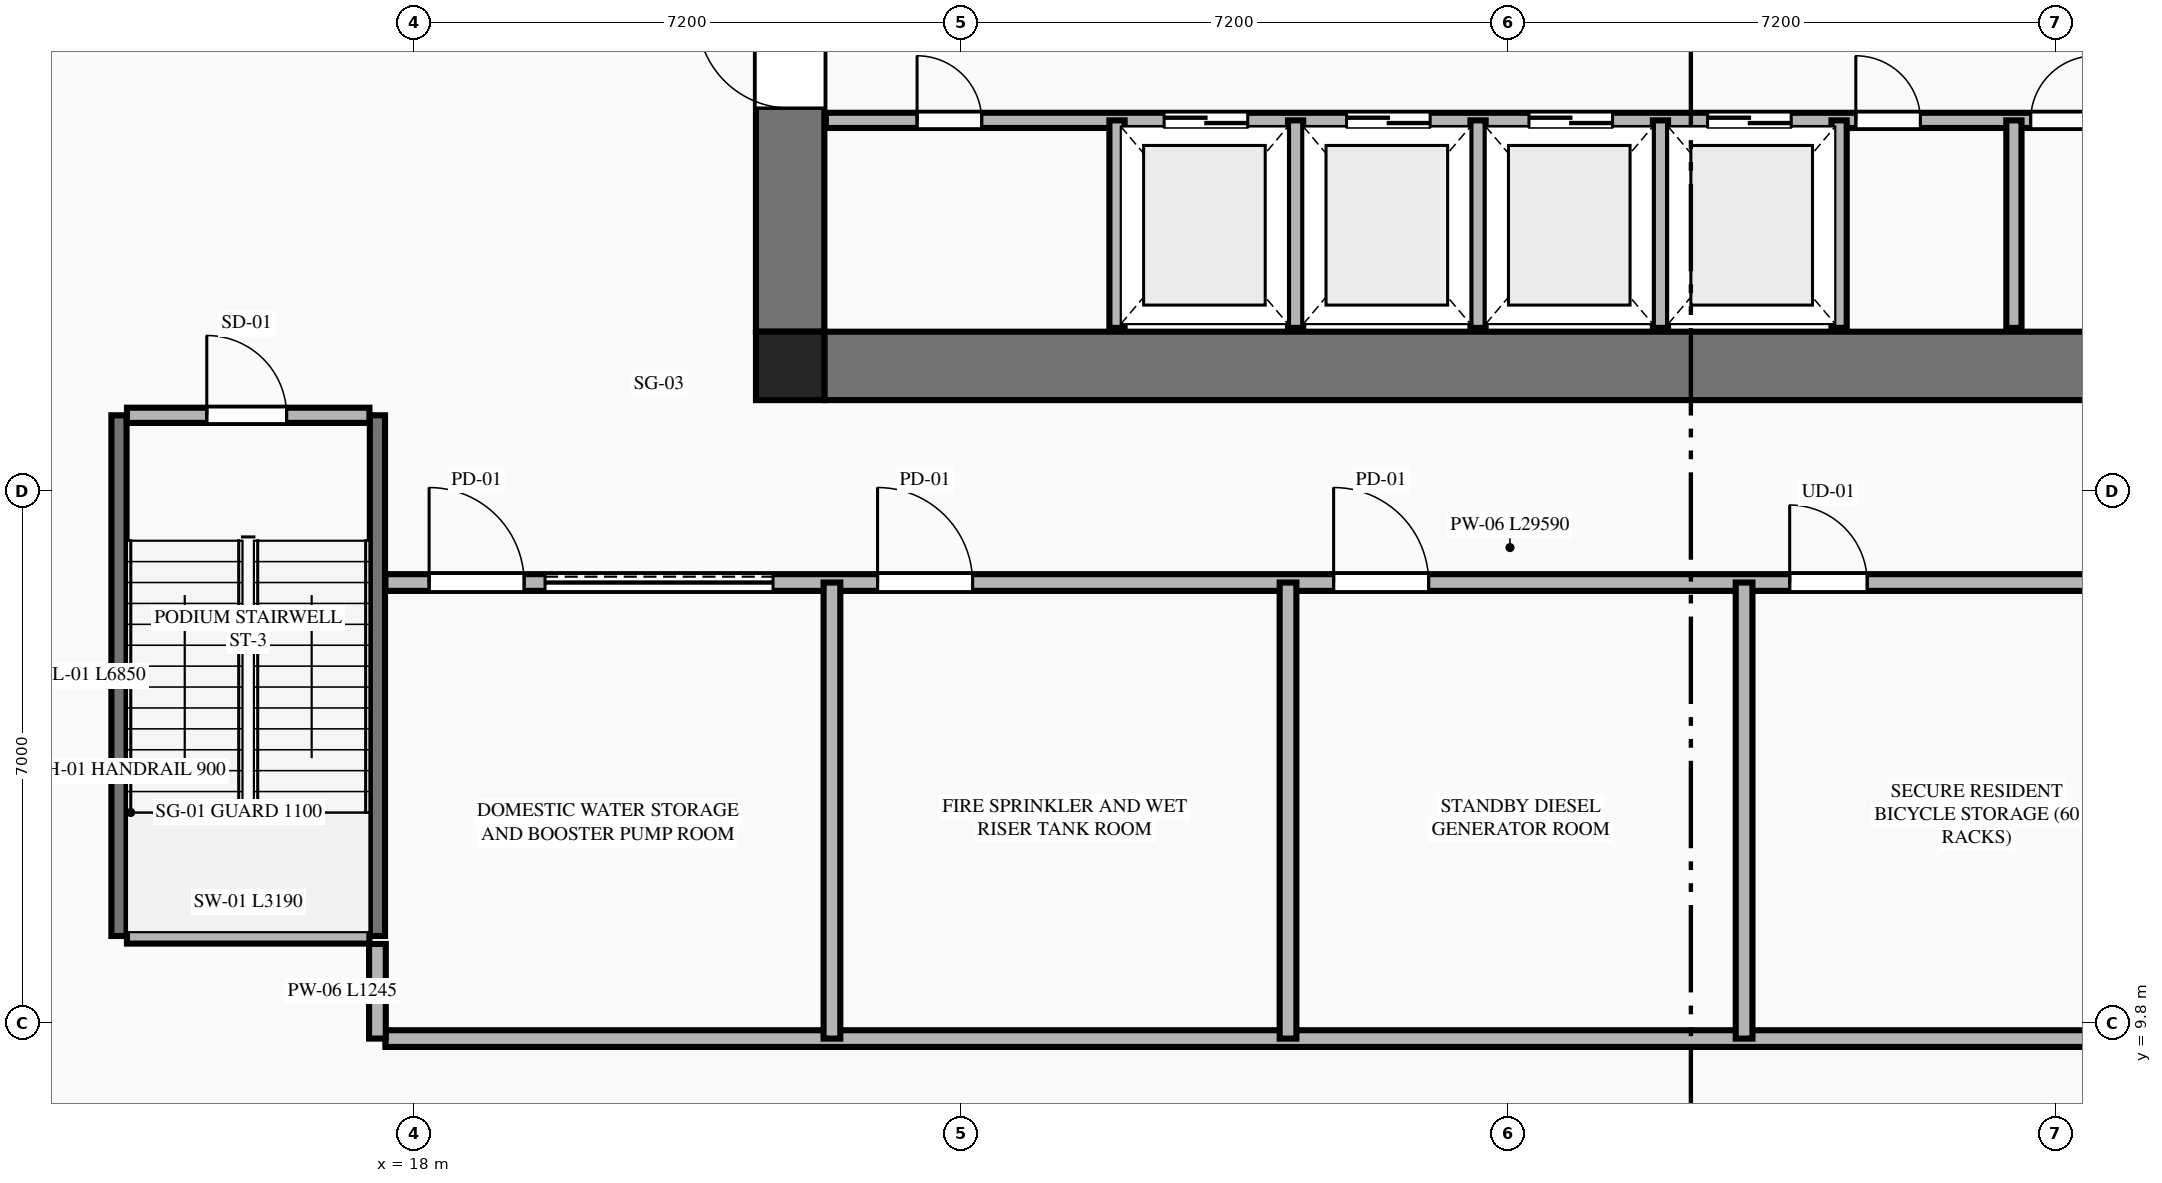
"""IFC4 building model, lengths in metres.
Left out: names, types, materials, properties, quantities, classifications, styles, units other than length and angle.
Written with IfcOpenShell. Run it as: python <this file> out.ifc"""

import sys

from ifc_helpers import new_model, si_unit, direction, frame, frame_2d, origin, origin_2d, place, context, subcontext, project, spatial, rectangle, extrude, element, fill, save


model = new_model("IFC4")
c1 = context("Model", 3, precision=1e-05, world=origin(), true_north=direction((0.0, 1.0)))
c2 = subcontext(c1, "Body", "Model", "MODEL_VIEW")
j1 = project(units=[si_unit("LENGTHUNIT", "METRE"), si_unit("PLANEANGLEUNIT", "RADIAN")], contexts=[c1])
p1 = place(None, origin())
s1 = spatial("IfcSite", under=j1, at=p1, CompositionType="ELEMENT")
p2 = place(p1, origin())
s2 = spatial("IfcBuilding", under=s1, at=p2, CompositionType="ELEMENT")
p3 = place(p2, frame((0.0, 0.0, -4.8)))
s3 = spatial("IfcBuildingStorey", under=s2, at=p3, CompositionType="ELEMENT", Elevation=-4.8)
p4 = place(p3, frame((1.027, 24.488, 0.0), z_axis=(0.0, 0.0, 1.0), x_axis=(0.484504224603, -0.874788921021, 0.0)))
e1 = element("IfcWall", 1, at=p4, inside=s3, PredefinedType="USERDEFINED", context=c2, shape_type="SweptSolid", body=[
    extrude(rectangle(XDim=26.15, YDim=0.6, at=frame_2d((13.075, 0.0))), origin(), (0.0, 0.0, 1.0), 4.55),
])
p5 = place(p3, frame((22.95, 18.45, 0.0), z_axis=(0.0, 0.0, 1.0), x_axis=(1.0, 0.0, 0.0)))
e2 = element("IfcColumn", 2, at=p5, inside=s3, PredefinedType="COLUMN", context=c2, shape_type="SweptSolid", body=[
    extrude(rectangle(XDim=0.9, YDim=0.9, at=origin_2d()), origin(), (0.0, 0.0, 1.0), 4.8),
])
p6 = place(p3, frame((23.4, 18.45, 0.0), z_axis=(0.0, 0.0, 1.0), x_axis=(1.0, 0.0, 0.0)))
e3 = element("IfcWall", 3, at=p6, inside=s3, PredefinedType="SHEAR", context=c2, shape_type="SweptSolid", body=[
    extrude(rectangle(XDim=18.0, YDim=0.9, at=frame_2d((9.0, 0.0))), origin(), (0.0, 0.0, 1.0), 4.55),
])
p7 = place(p3, frame((22.95, 18.9, 0.0), z_axis=(0.0, 0.0, 1.0), x_axis=(0.0, 1.0, 0.0)))
e4 = element("IfcWall", 4, at=p7, inside=s3, PredefinedType="SHEAR", context=c2, shape_type="SweptSolid", body=[
    extrude(rectangle(XDim=14.0, YDim=0.9, at=frame_2d((7.0, 0.0))), origin(), (0.0, 0.0, 1.0), 4.55),
])
p8 = place(p7, frame((2.94, 0.0, 0.0)))
e5 = element("IfcOpeningElement", 5, at=p8, cuts=e4, PredefinedType="OPENING", context=c2, shape_type="SweptSolid", body=[
    extrude(rectangle(XDim=1.22, YDim=2.25, at=frame_2d((0.61, 1.125))), frame((0.0, 0.46, 0.0), z_axis=(0.0, -1.0, 0.0), x_axis=(1.0, 0.0, 0.0)), (0.0, 0.0, 1.0), 0.92),
])
p9 = place(p3, frame((23.42, 21.68, 0.0), z_axis=(0.0, 0.0, 1.0), x_axis=(1.0, 0.0, 0.0)))
e6 = element("IfcWall", 6, at=p9, inside=s3, PredefinedType="PLUMBINGWALL", context=c2, shape_type="SweptSolid", body=[
    extrude(rectangle(XDim=17.96, YDim=0.2, at=frame_2d((8.98, 0.0))), origin(), (0.0, 0.0, 1.0), 4.55),
])
p10 = place(p9, frame((4.45, 0.0, 0.0)))
e7 = element("IfcOpeningElement", 7, at=p10, cuts=e6, PredefinedType="OPENING", context=c2, shape_type="SweptSolid", body=[
    extrude(rectangle(XDim=1.1, YDim=2.2, at=frame_2d((0.55, 1.1))), frame((0.0, 0.11, 0.0), z_axis=(0.0, -1.0, 0.0), x_axis=(1.0, 0.0, 0.0)), (0.0, 0.0, 1.0), 0.22),
])
p11 = place(p9, frame((6.85, 0.0, 0.0)))
e8 = element("IfcOpeningElement", 8, at=p11, cuts=e6, PredefinedType="OPENING", context=c2, shape_type="SweptSolid", body=[
    extrude(rectangle(XDim=1.1, YDim=2.2, at=frame_2d((0.55, 1.1))), frame((0.0, 0.11, 0.0), z_axis=(0.0, -1.0, 0.0), x_axis=(1.0, 0.0, 0.0)), (0.0, 0.0, 1.0), 0.22),
])
p12 = place(p9, frame((9.25, 0.0, 0.0)))
e9 = element("IfcOpeningElement", 9, at=p12, cuts=e6, PredefinedType="OPENING", context=c2, shape_type="SweptSolid", body=[
    extrude(rectangle(XDim=1.1, YDim=2.2, at=frame_2d((0.55, 1.1))), frame((0.0, 0.11, 0.0), z_axis=(0.0, -1.0, 0.0), x_axis=(1.0, 0.0, 0.0)), (0.0, 0.0, 1.0), 0.22),
])
p13 = place(p9, frame((11.6, 0.0, 0.0)))
e10 = element("IfcOpeningElement", 10, at=p13, cuts=e6, PredefinedType="OPENING", context=c2, shape_type="SweptSolid", body=[
    extrude(rectangle(XDim=1.1, YDim=2.2, at=frame_2d((0.55, 1.1))), frame((0.0, 0.11, 0.0), z_axis=(0.0, -1.0, 0.0), x_axis=(1.0, 0.0, 0.0)), (0.0, 0.0, 1.0), 0.22),
])
p14 = place(p9, frame((1.2, 0.0, 0.0)))
e11 = element("IfcOpeningElement", 11, at=p14, cuts=e6, PredefinedType="OPENING", context=c2, shape_type="SweptSolid", body=[
    extrude(rectangle(XDim=0.85, YDim=2.05, at=frame_2d((0.425, 1.025))), frame((0.0, 0.11, 0.0), z_axis=(0.0, -1.0, 0.0), x_axis=(1.0, 0.0, 0.0)), (0.0, 0.0, 1.0), 0.22),
])
p15 = place(p9, frame((13.55, 0.0, 0.0)))
e12 = element("IfcOpeningElement", 12, at=p15, cuts=e6, PredefinedType="OPENING", context=c2, shape_type="SweptSolid", body=[
    extrude(rectangle(XDim=0.85, YDim=2.05, at=frame_2d((0.425, 1.025))), frame((0.0, 0.11, 0.0), z_axis=(0.0, -1.0, 0.0), x_axis=(1.0, 0.0, 0.0)), (0.0, 0.0, 1.0), 0.22),
])
p16 = place(p9, frame((15.85, 0.0, 0.0)))
e13 = element("IfcOpeningElement", 13, at=p16, cuts=e6, PredefinedType="OPENING", context=c2, shape_type="SweptSolid", body=[
    extrude(rectangle(XDim=0.85, YDim=2.05, at=frame_2d((0.425, 1.025))), frame((0.0, 0.11, 0.0), z_axis=(0.0, -1.0, 0.0), x_axis=(1.0, 0.0, 0.0)), (0.0, 0.0, 1.0), 0.22),
])
for number, where, z_axis, x_axis in (
    (14, (27.25, 18.95, 0.0), (0.0, 0.0, 1.0), (0.0, 1.0, 0.0)),
    (15, (29.6, 18.95, 0.0), (0.0, 0.0, 1.0), (0.0, 1.0, 0.0)),
    (16, (32.0, 18.95, 0.0), (0.0, 0.0, 1.0), (0.0, 1.0, 0.0)),
    (17, (34.4, 18.95, 0.0), (0.0, 0.0, 1.0), (0.0, 1.0, 0.0)),
    (18, (36.75, 18.95, 0.0), (0.0, 0.0, 1.0), (0.0, 1.0, 0.0)),
    (19, (39.05, 18.95, 0.0), (0.0, 0.0, 1.0), (0.0, 1.0, 0.0)),
):
    element("IfcWall", number, at=place(p3, frame(where, z_axis=z_axis, x_axis=x_axis)), inside=s3, PredefinedType="PLUMBINGWALL", context=c2, shape_type="SweptSolid", body=[
        extrude(rectangle(XDim=2.73, YDim=0.2, at=frame_2d((1.365, 0.0))), origin(), (0.0, 0.0, 1.0), 4.55),
    ])
for number, where, z_axis, x_axis in (
    (20, (14.12, 10.95, 0.0), (0.0, 0.0, 1.0), (0.0, 1.0, 0.0)),
    (21, (17.52, 10.95, 0.0), (0.0, 0.0, 1.0), (0.0, 1.0, 0.0)),
):
    element("IfcWall", number, at=place(p3, frame(where, z_axis=z_axis, x_axis=x_axis)), inside=s3, PredefinedType="SHEAR", context=c2, shape_type="SweptSolid", body=[
        extrude(rectangle(XDim=6.85, YDim=0.2, at=frame_2d((3.425, 0.0))), origin(), (0.0, 0.0, 1.0), 4.8),
    ])
p17 = place(p3, frame((14.225, 10.95, 0.0), z_axis=(0.0, 0.0, 1.0), x_axis=(1.0, 0.0, 0.0)))
e22 = element("IfcWall", 22, at=p17, inside=s3, PredefinedType="PLUMBINGWALL", context=c2, shape_type="SweptSolid", body=[
    extrude(rectangle(XDim=3.19, YDim=0.2, at=frame_2d((1.595, 0.0))), origin(), (0.0, 0.0, 1.0), 4.55),
])
p18 = place(p3, frame((14.225, 17.8, 0.0), z_axis=(0.0, 0.0, 1.0), x_axis=(1.0, 0.0, 0.0)))
e23 = element("IfcWall", 23, at=p18, inside=s3, PredefinedType="PLUMBINGWALL", context=c2, shape_type="SweptSolid", body=[
    extrude(rectangle(XDim=3.19, YDim=0.2, at=frame_2d((1.595, 0.0))), origin(), (0.0, 0.0, 1.0), 4.55),
])
p19 = place(p18, frame((1.05, 0.0, 0.0)))
e24 = element("IfcOpeningElement", 24, at=p19, cuts=e23, PredefinedType="OPENING", context=c2, shape_type="SweptSolid", body=[
    extrude(rectangle(XDim=1.05, YDim=2.15, at=frame_2d((0.525, 1.075))), frame((0.0, 0.11, 0.0), z_axis=(0.0, -1.0, 0.0), x_axis=(1.0, 0.0, 0.0)), (0.0, 0.0, 1.0), 0.22),
])
p20 = place(p3, frame((17.625, 15.6, 0.0), z_axis=(0.0, 0.0, 1.0), x_axis=(1.0, 0.0, 0.0)))
e25 = element("IfcWall", 25, at=p20, inside=s3, PredefinedType="PARTITIONING", context=c2, shape_type="SweptSolid", body=[
    extrude(rectangle(XDim=29.59, YDim=0.22, at=frame_2d((14.795, 0.0))), origin(), (0.0, 0.0, 1.0), 4.55),
])
p21 = place(p20, frame((0.575, 0.0, 0.0)))
e26 = element("IfcOpeningElement", 26, at=p21, cuts=e25, PredefinedType="OPENING", context=c2, shape_type="SweptSolid", body=[
    extrude(rectangle(XDim=1.25, YDim=2.25, at=frame_2d((0.625, 1.125))), frame((0.0, 0.12, 0.0), z_axis=(0.0, -1.0, 0.0), x_axis=(1.0, 0.0, 0.0)), (0.0, 0.0, 1.0), 0.24),
])
p22 = place(p20, frame((6.475, 0.0, 0.0)))
e27 = element("IfcOpeningElement", 27, at=p22, cuts=e25, PredefinedType="OPENING", context=c2, shape_type="SweptSolid", body=[
    extrude(rectangle(XDim=1.25, YDim=2.25, at=frame_2d((0.625, 1.125))), frame((0.0, 0.12, 0.0), z_axis=(0.0, -1.0, 0.0), x_axis=(1.0, 0.0, 0.0)), (0.0, 0.0, 1.0), 0.24),
])
p23 = place(p20, frame((12.475, 0.0, 0.0)))
e28 = element("IfcOpeningElement", 28, at=p23, cuts=e25, PredefinedType="OPENING", context=c2, shape_type="SweptSolid", body=[
    extrude(rectangle(XDim=1.25, YDim=2.25, at=frame_2d((0.625, 1.125))), frame((0.0, 0.12, 0.0), z_axis=(0.0, -1.0, 0.0), x_axis=(1.0, 0.0, 0.0)), (0.0, 0.0, 1.0), 0.24),
])
p24 = place(p20, frame((18.475, 0.0, 0.0)))
e29 = element("IfcOpeningElement", 29, at=p24, cuts=e25, PredefinedType="OPENING", context=c2, shape_type="SweptSolid", body=[
    extrude(rectangle(XDim=1.02, YDim=2.25, at=frame_2d((0.51, 1.125))), frame((0.0, 0.12, 0.0), z_axis=(0.0, -1.0, 0.0), x_axis=(1.0, 0.0, 0.0)), (0.0, 0.0, 1.0), 0.24),
])
p25 = place(p20, frame((24.475, 0.0, 0.0)))
e30 = element("IfcOpeningElement", 30, at=p25, cuts=e25, PredefinedType="OPENING", context=c2, shape_type="SweptSolid", body=[
    extrude(rectangle(XDim=0.86, YDim=2.1, at=frame_2d((0.43, 1.05))), frame((0.0, 0.12, 0.0), z_axis=(0.0, -1.0, 0.0), x_axis=(1.0, 0.0, 0.0)), (0.0, 0.0, 1.0), 0.24),
])
p26 = place(p20, frame((27.475, 0.0, 0.0)))
e31 = element("IfcOpeningElement", 31, at=p26, cuts=e25, PredefinedType="OPENING", context=c2, shape_type="SweptSolid", body=[
    extrude(rectangle(XDim=0.96, YDim=2.15, at=frame_2d((0.48, 1.075))), frame((0.0, 0.12, 0.0), z_axis=(0.0, -1.0, 0.0), x_axis=(1.0, 0.0, 0.0)), (0.0, 0.0, 1.0), 0.24),
])
p27 = place(p20, frame((2.1, 0.0, 0.0)))
e32 = element("IfcOpeningElement", 32, at=p27, cuts=e25, PredefinedType="OPENING", context=c2, shape_type="SweptSolid", body=[
    extrude(rectangle(XDim=3.0, YDim=2.55, at=frame_2d((1.5, 1.275))), frame((0.0, 0.12, 0.0), z_axis=(0.0, -1.0, 0.0), x_axis=(1.0, 0.0, 0.0)), (0.0, 0.0, 1.0), 0.24),
])
p28 = place(p3, frame((17.625, 9.6, 0.0), z_axis=(0.0, 0.0, 1.0), x_axis=(1.0, 0.0, 0.0)))
e33 = element("IfcWall", 33, at=p28, inside=s3, PredefinedType="PARTITIONING", context=c2, shape_type="SweptSolid", body=[
    extrude(rectangle(XDim=29.59, YDim=0.22, at=frame_2d((14.795, 0.0))), origin(), (0.0, 0.0, 1.0), 4.55),
])
p29 = place(p3, frame((17.52, 9.6, 0.0), z_axis=(0.0, 0.0, 1.0), x_axis=(0.0, 1.0, 0.0)))
e34 = element("IfcWall", 34, at=p29, inside=s3, PredefinedType="PARTITIONING", context=c2, shape_type="SweptSolid", body=[
    extrude(rectangle(XDim=1.245, YDim=0.22, at=frame_2d((0.623, 0.0))), origin(), (0.0, 0.0, 1.0), 4.55),
])
p30 = place(p3, frame((23.5, 9.6, 0.0), z_axis=(0.0, 0.0, 1.0), x_axis=(0.0, 1.0, 0.0)))
e35 = element("IfcWall", 35, at=p30, inside=s3, PredefinedType="PARTITIONING", context=c2, shape_type="SweptSolid", body=[
    extrude(rectangle(XDim=6.0, YDim=0.22, at=frame_2d((3.0, 0.0))), origin(), (0.0, 0.0, 1.0), 3.689),
])
for number, where, z_axis, x_axis in (
    (36, (29.5, 9.6, 0.0), (0.0, 0.0, 1.0), (0.0, 1.0, 0.0)),
    (37, (35.5, 9.6, 0.0), (0.0, 0.0, 1.0), (0.0, 1.0, 0.0)),
):
    element("IfcWall", number, at=place(p3, frame(where, z_axis=z_axis, x_axis=x_axis)), inside=s3, PredefinedType="PARTITIONING", context=c2, shape_type="SweptSolid", body=[
        extrude(rectangle(XDim=6.0, YDim=0.22, at=frame_2d((3.0, 0.0))), origin(), (0.0, 0.0, 1.0), 4.55),
    ])
p31 = place(p8, origin())
e38 = element("IfcDoor", 38, at=p31, inside=s3, OperationType="SINGLE_SWING_RIGHT", PredefinedType="DOOR", context=c2, shape_type="SweptSolid", body=[
    extrude(rectangle(XDim=1.22, YDim=2.25, at=frame_2d((0.61, 1.125))), frame((0.0, 0.025, 0.0), z_axis=(0.0, -1.0, 0.0), x_axis=(1.0, 0.0, 0.0)), (0.0, 0.0, 1.0), 0.05),
])
fill(e5, e38)
p32 = place(p10, origin())
e39 = element("IfcDoor", 39, at=p32, inside=s3, OperationType="DOUBLE_DOOR_SLIDING", PredefinedType="DOOR", context=c2, shape_type="SweptSolid", body=[
    extrude(rectangle(XDim=1.1, YDim=2.2, at=frame_2d((0.55, 1.1))), frame((0.0, 0.025, 0.0), z_axis=(0.0, -1.0, 0.0), x_axis=(1.0, 0.0, 0.0)), (0.0, 0.0, 1.0), 0.05),
])
fill(e7, e39)
p33 = place(p11, origin())
e40 = element("IfcDoor", 40, at=p33, inside=s3, OperationType="DOUBLE_DOOR_SLIDING", PredefinedType="DOOR", context=c2, shape_type="SweptSolid", body=[
    extrude(rectangle(XDim=1.1, YDim=2.2, at=frame_2d((0.55, 1.1))), frame((0.0, 0.025, 0.0), z_axis=(0.0, -1.0, 0.0), x_axis=(1.0, 0.0, 0.0)), (0.0, 0.0, 1.0), 0.05),
])
fill(e8, e40)
p34 = place(p12, origin())
e41 = element("IfcDoor", 41, at=p34, inside=s3, OperationType="DOUBLE_DOOR_SLIDING", PredefinedType="DOOR", context=c2, shape_type="SweptSolid", body=[
    extrude(rectangle(XDim=1.1, YDim=2.2, at=frame_2d((0.55, 1.1))), frame((0.0, 0.025, 0.0), z_axis=(0.0, -1.0, 0.0), x_axis=(1.0, 0.0, 0.0)), (0.0, 0.0, 1.0), 0.05),
])
fill(e9, e41)
p35 = place(p13, origin())
e42 = element("IfcDoor", 42, at=p35, inside=s3, OperationType="DOUBLE_DOOR_SLIDING", PredefinedType="DOOR", context=c2, shape_type="SweptSolid", body=[
    extrude(rectangle(XDim=1.1, YDim=2.2, at=frame_2d((0.55, 1.1))), frame((0.0, 0.025, 0.0), z_axis=(0.0, -1.0, 0.0), x_axis=(1.0, 0.0, 0.0)), (0.0, 0.0, 1.0), 0.05),
])
fill(e10, e42)
p36 = place(p14, origin())
e43 = element("IfcDoor", 43, at=p36, inside=s3, OperationType="SINGLE_SWING_LEFT", PredefinedType="DOOR", context=c2, shape_type="SweptSolid", body=[
    extrude(rectangle(XDim=0.85, YDim=2.05, at=frame_2d((0.425, 1.025))), frame((0.0, 0.025, 0.0), z_axis=(0.0, -1.0, 0.0), x_axis=(1.0, 0.0, 0.0)), (0.0, 0.0, 1.0), 0.05),
])
fill(e11, e43)
p37 = place(p15, origin())
e44 = element("IfcDoor", 44, at=p37, inside=s3, OperationType="SINGLE_SWING_LEFT", PredefinedType="DOOR", context=c2, shape_type="SweptSolid", body=[
    extrude(rectangle(XDim=0.85, YDim=2.05, at=frame_2d((0.425, 1.025))), frame((0.0, 0.025, 0.0), z_axis=(0.0, -1.0, 0.0), x_axis=(1.0, 0.0, 0.0)), (0.0, 0.0, 1.0), 0.05),
])
fill(e12, e44)
p38 = place(p16, origin())
e45 = element("IfcDoor", 45, at=p38, inside=s3, OperationType="SINGLE_SWING_RIGHT", PredefinedType="DOOR", context=c2, shape_type="SweptSolid", body=[
    extrude(rectangle(XDim=0.85, YDim=2.05, at=frame_2d((0.425, 1.025))), frame((0.0, 0.025, 0.0), z_axis=(0.0, -1.0, 0.0), x_axis=(1.0, 0.0, 0.0)), (0.0, 0.0, 1.0), 0.05),
])
fill(e13, e45)
p39 = place(p19, origin())
e46 = element("IfcDoor", 46, at=p39, inside=s3, OperationType="SINGLE_SWING_LEFT", PredefinedType="DOOR", context=c2, shape_type="SweptSolid", body=[
    extrude(rectangle(XDim=1.05, YDim=2.15, at=frame_2d((0.525, 1.075))), frame((0.0, 0.025, 0.0), z_axis=(0.0, -1.0, 0.0), x_axis=(1.0, 0.0, 0.0)), (0.0, 0.0, 1.0), 0.05),
])
fill(e24, e46)
p40 = place(p21, origin())
e47 = element("IfcDoor", 47, at=p40, inside=s3, OperationType="SINGLE_SWING_LEFT", PredefinedType="DOOR", context=c2, shape_type="SweptSolid", body=[
    extrude(rectangle(XDim=1.25, YDim=2.25, at=frame_2d((0.625, 1.125))), frame((0.0, 0.025, 0.0), z_axis=(0.0, -1.0, 0.0), x_axis=(1.0, 0.0, 0.0)), (0.0, 0.0, 1.0), 0.05),
])
fill(e26, e47)
p41 = place(p22, origin())
e48 = element("IfcDoor", 48, at=p41, inside=s3, OperationType="SINGLE_SWING_LEFT", PredefinedType="DOOR", context=c2, shape_type="SweptSolid", body=[
    extrude(rectangle(XDim=1.25, YDim=2.25, at=frame_2d((0.625, 1.125))), frame((0.0, 0.025, 0.0), z_axis=(0.0, -1.0, 0.0), x_axis=(1.0, 0.0, 0.0)), (0.0, 0.0, 1.0), 0.05),
])
fill(e27, e48)
p42 = place(p23, origin())
e49 = element("IfcDoor", 49, at=p42, inside=s3, OperationType="SINGLE_SWING_LEFT", PredefinedType="DOOR", context=c2, shape_type="SweptSolid", body=[
    extrude(rectangle(XDim=1.25, YDim=2.25, at=frame_2d((0.625, 1.125))), frame((0.0, 0.025, 0.0), z_axis=(0.0, -1.0, 0.0), x_axis=(1.0, 0.0, 0.0)), (0.0, 0.0, 1.0), 0.05),
])
fill(e28, e49)
p43 = place(p24, origin())
e50 = element("IfcDoor", 50, at=p43, inside=s3, OperationType="SINGLE_SWING_LEFT", PredefinedType="DOOR", context=c2, shape_type="SweptSolid", body=[
    extrude(rectangle(XDim=1.02, YDim=2.25, at=frame_2d((0.51, 1.125))), frame((0.0, 0.025, 0.0), z_axis=(0.0, -1.0, 0.0), x_axis=(1.0, 0.0, 0.0)), (0.0, 0.0, 1.0), 0.05),
])
fill(e29, e50)
p44 = place(p27, origin())
e51 = element("IfcDoor", 51, at=p44, inside=s3, OperationType="DOUBLE_DOOR_SINGLE_SWING", PredefinedType="GATE", context=c2, shape_type="SweptSolid", body=[
    extrude(rectangle(XDim=3.0, YDim=2.55, at=frame_2d((1.5, 1.275))), frame((0.0, 0.025, 0.0), z_axis=(0.0, -1.0, 0.0), x_axis=(1.0, 0.0, 0.0)), (0.0, 0.0, 1.0), 0.05),
])
fill(e32, e51)
save(model, sys.argv[1])
